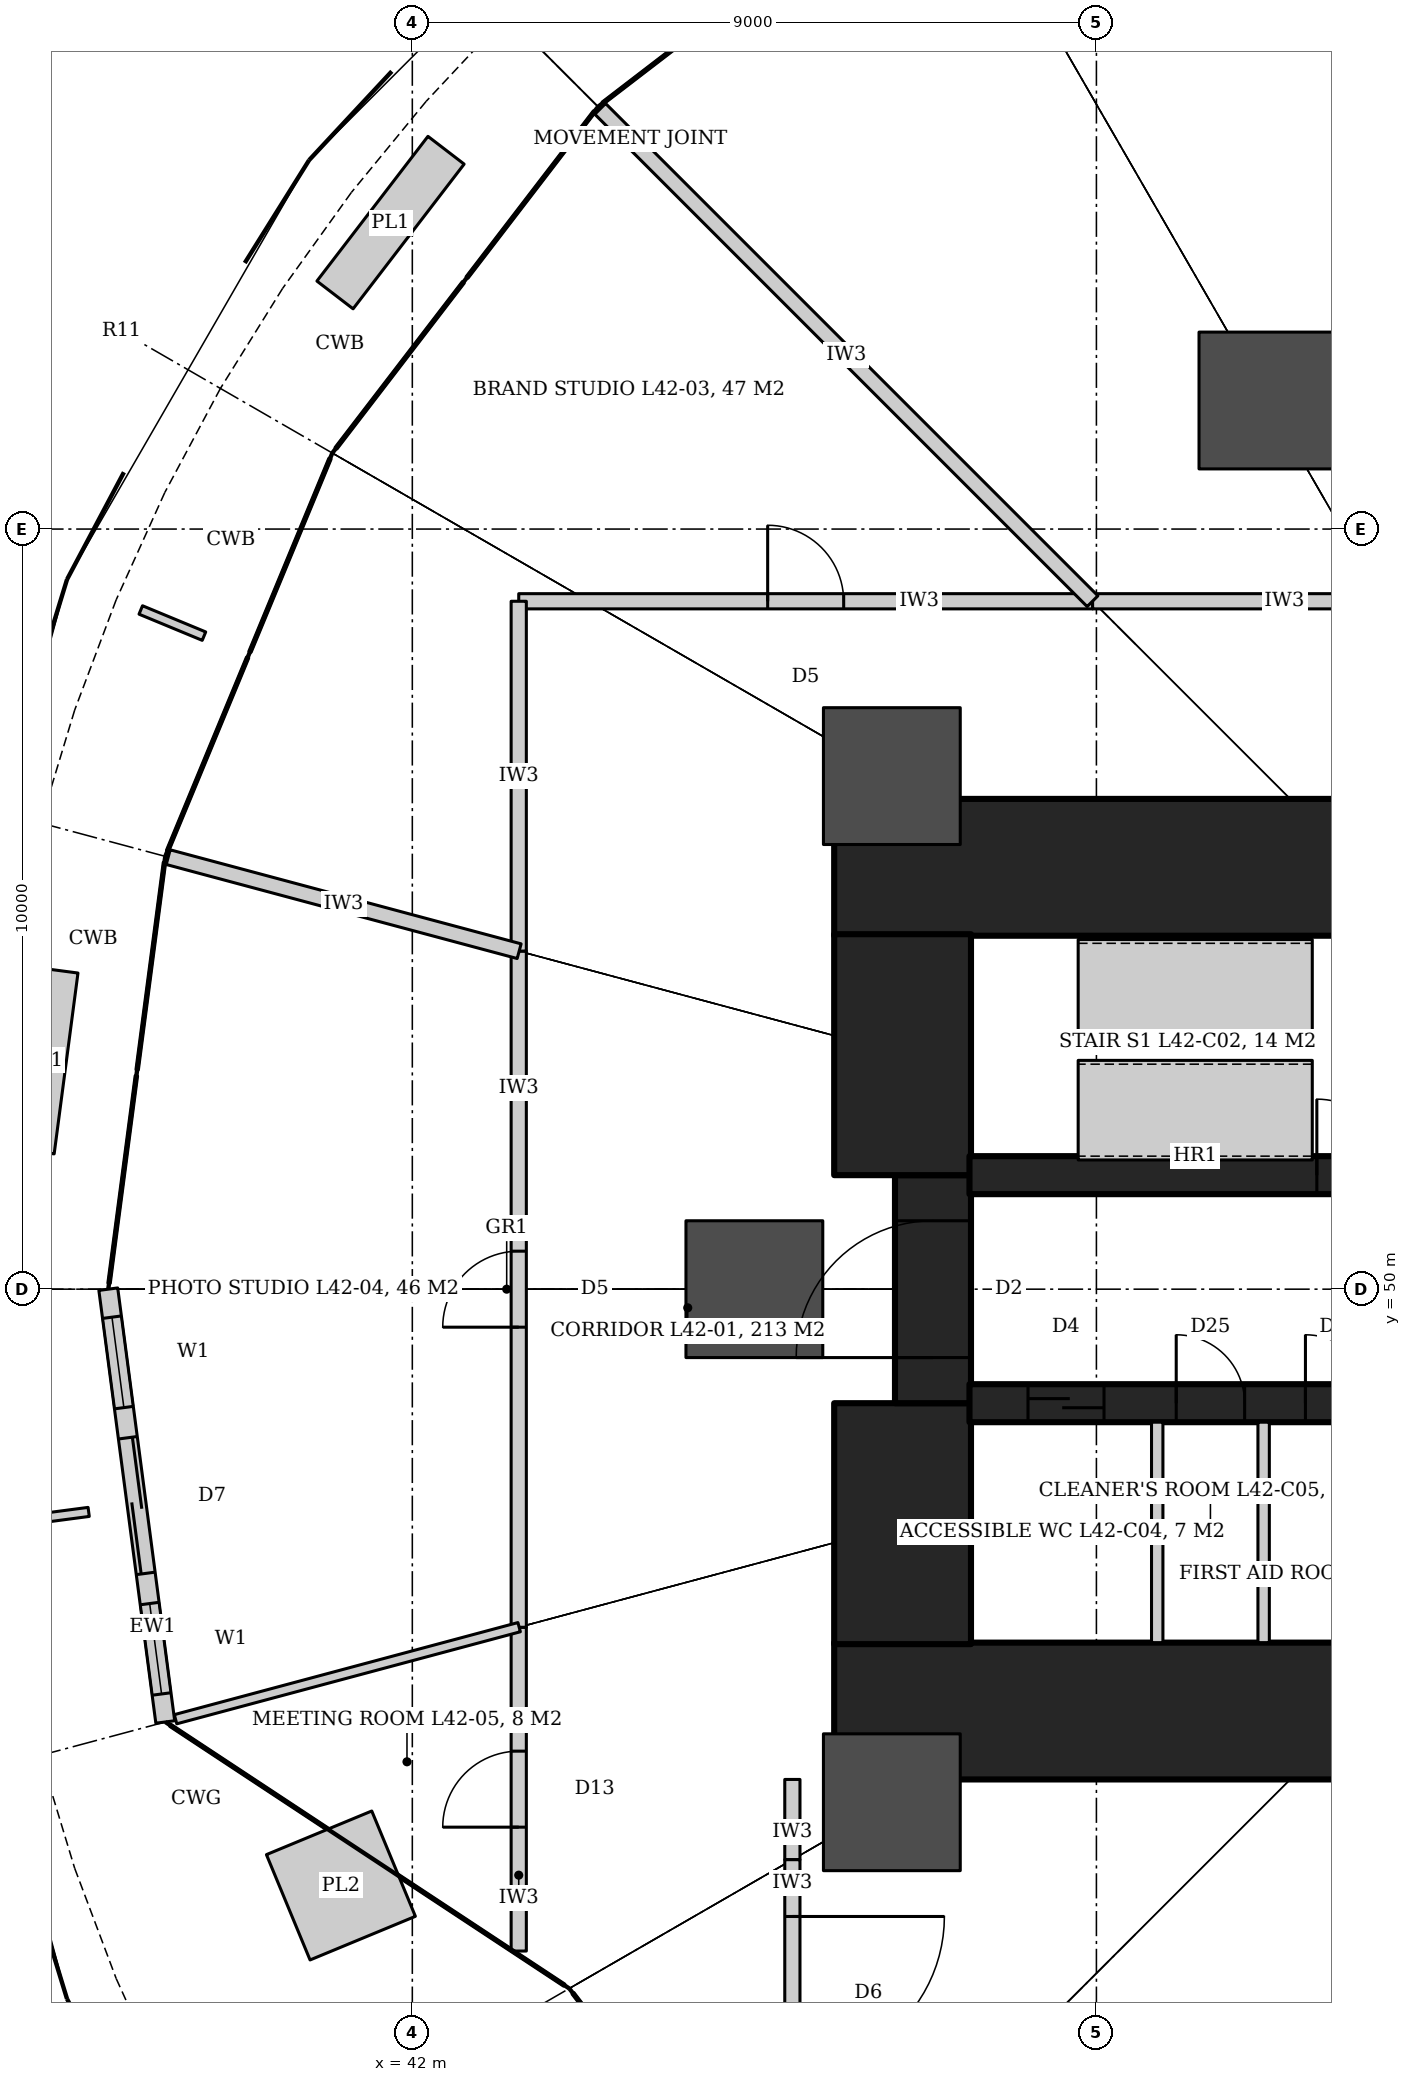
"""IFC4 building model, lengths in metres.
Left out: names, types, materials, properties, quantities, classifications, styles, units other than length and angle.
Written with IfcOpenShell. Run it as: python <this file> out.ifc"""

import sys

from ifc_helpers import new_model, si_unit, direction, frame, frame_2d, origin, origin_2d, place, context, subcontext, project, spatial, rectangle, hollow_circle, extrude, element, fill, save


model = new_model("IFC4")
c1 = context("Model", 3, precision=1e-05, world=origin(), true_north=direction((0.0, 1.0)))
c2 = subcontext(c1, "Body", "Model", "MODEL_VIEW")
j1 = project(units=[si_unit("LENGTHUNIT", "METRE"), si_unit("PLANEANGLEUNIT", "RADIAN")], contexts=[c1])
p1 = place(None, origin())
s1 = spatial("IfcSite", under=j1, at=p1, CompositionType="ELEMENT")
p2 = place(p1, origin())
s2 = spatial("IfcBuilding", under=s1, at=p2, CompositionType="ELEMENT")
p3 = place(p2, frame((0.0, 0.0, 185.6)))
s3 = spatial("IfcBuildingStorey", under=s2, at=p3, CompositionType="ELEMENT", Elevation=185.6)
for number, where, z_axis, x_axis in (
    (1, (47.55, 55.55, 0.0), (0.0, 0.0, 1.0), (1.0, 0.0, 0.0)),
    (2, (47.55, 44.45, 0.0), (0.0, 0.0, 1.0), (1.0, 0.0, 0.0)),
):
    element("IfcWall", number, at=place(p3, frame(where, z_axis=z_axis, x_axis=x_axis)), inside=s3, PredefinedType="SHEAR", context=c2, shape_type="SweptSolid", body=[
        extrude(rectangle(XDim=7.85, YDim=1.8, at=frame_2d((3.925, 0.0))), origin(), (0.0, 0.0, 1.0), 4.2),
    ])
p4 = place(p3, frame((48.45, 45.33, 0.0), z_axis=(0.0, 0.0, 1.0), x_axis=(0.0, 1.0, 0.0)))
e3 = element("IfcWall", 3, at=p4, inside=s3, PredefinedType="SHEAR", context=c2, shape_type="SweptSolid", body=[
    extrude(rectangle(XDim=3.17, YDim=1.8, at=frame_2d((1.585, 0.0))), origin(), (0.0, 0.0, 1.0), 4.2),
])
p5 = place(p3, frame((48.85, 48.5, 0.0), z_axis=(0.0, 0.0, 1.0), x_axis=(0.0, 1.0, 0.0)))
e4 = element("IfcWall", 4, at=p5, inside=s3, PredefinedType="SHEAR", context=c2, shape_type="SweptSolid", body=[
    extrude(rectangle(XDim=3.0, YDim=1.0, at=frame_2d((1.5, 0.0))), origin(), (0.0, 0.0, 1.0), 4.2),
])
p6 = place(p5, frame((0.6, 0.0, 0.0)))
e5 = element("IfcOpeningElement", 5, at=p6, cuts=e4, PredefinedType="OPENING", context=c2, shape_type="SweptSolid", body=[
    extrude(rectangle(XDim=1.8, YDim=2.1, at=frame_2d((0.9, 1.05))), frame((0.0, 0.51, 0.0), z_axis=(0.0, -1.0, 0.0), x_axis=(1.0, 0.0, 0.0)), (0.0, 0.0, 1.0), 1.02),
])
p7 = place(p3, frame((48.45, 51.5, 0.0), z_axis=(0.0, 0.0, 1.0), x_axis=(0.0, 1.0, 0.0)))
e6 = element("IfcWall", 6, at=p7, inside=s3, PredefinedType="SHEAR", context=c2, shape_type="SweptSolid", body=[
    extrude(rectangle(XDim=3.17, YDim=1.8, at=frame_2d((1.585, 0.0))), origin(), (0.0, 0.0, 1.0), 4.2),
])
p8 = place(p3, frame((49.33, 51.5, 0.0), z_axis=(0.0, 0.0, 1.0), x_axis=(1.0, 0.0, 0.0)))
e7 = element("IfcWall", 7, at=p8, inside=s3, PredefinedType="SHEAR", context=c2, shape_type="SweptSolid", body=[
    extrude(rectangle(XDim=6.07, YDim=0.5, at=frame_2d((3.035, 0.0))), origin(), (0.0, 0.0, 1.0), 4.2),
])
p9 = place(p8, frame((4.57, 0.0, 0.0)))
e8 = element("IfcOpeningElement", 8, at=p9, cuts=e7, PredefinedType="OPENING", context=c2, shape_type="SweptSolid", body=[
    extrude(rectangle(XDim=1.0, YDim=2.1, at=frame_2d((0.5, 1.05))), frame((0.0, 0.26, 0.0), z_axis=(0.0, -1.0, 0.0), x_axis=(1.0, 0.0, 0.0)), (0.0, 0.0, 1.0), 0.52),
])
p10 = place(p3, frame((49.33, 48.5, 0.0), z_axis=(0.0, 0.0, 1.0), x_axis=(1.0, 0.0, 0.0)))
e9 = element("IfcWall", 9, at=p10, inside=s3, PredefinedType="SHEAR", context=c2, shape_type="SweptSolid", body=[
    extrude(rectangle(XDim=6.07, YDim=0.5, at=frame_2d((3.035, 0.0))), origin(), (0.0, 0.0, 1.0), 4.2),
])
p11 = place(p10, frame((0.77, 0.0, 0.0)))
e10 = element("IfcOpeningElement", 10, at=p11, cuts=e9, PredefinedType="OPENING", context=c2, shape_type="SweptSolid", body=[
    extrude(rectangle(XDim=1.0, YDim=2.1, at=frame_2d((0.5, 1.05))), frame((0.0, 0.26, 0.0), z_axis=(0.0, -1.0, 0.0), x_axis=(1.0, 0.0, 0.0)), (0.0, 0.0, 1.0), 0.52),
])
p12 = place(p10, frame((2.72, 0.0, 0.0)))
e11 = element("IfcOpeningElement", 11, at=p12, cuts=e9, PredefinedType="OPENING", context=c2, shape_type="SweptSolid", body=[
    extrude(rectangle(XDim=0.9, YDim=2.1, at=frame_2d((0.45, 1.05))), frame((0.0, 0.26, 0.0), z_axis=(0.0, -1.0, 0.0), x_axis=(1.0, 0.0, 0.0)), (0.0, 0.0, 1.0), 0.52),
])
p13 = place(p10, frame((4.42, 0.0, 0.0)))
e12 = element("IfcOpeningElement", 12, at=p13, cuts=e9, PredefinedType="OPENING", context=c2, shape_type="SweptSolid", body=[
    extrude(rectangle(XDim=0.9, YDim=2.1, at=frame_2d((0.45, 1.05))), frame((0.0, 0.26, 0.0), z_axis=(0.0, -1.0, 0.0), x_axis=(1.0, 0.0, 0.0)), (0.0, 0.0, 1.0), 0.52),
])
for number, where, z_axis, x_axis in (
    (13, (53.25, 61.691, 0.0), (0.0, 0.0, 1.0), (1.0, 0.0, 0.0)),
    (14, (48.309, 56.75, 0.0), (0.0, 0.0, 1.0), (1.0, 0.0, 0.0)),
    (15, (46.5, 50.0, 0.0), (0.0, 0.0, 1.0), (1.0, 0.0, 0.0)),
    (16, (48.309, 43.25, 0.0), (0.0, 0.0, 1.0), (1.0, 0.0, 0.0)),
):
    element("IfcColumn", number, at=place(p3, frame(where, z_axis=z_axis, x_axis=x_axis)), inside=s3, PredefinedType="COLUMN", context=c2, shape_type="SweptSolid", body=[
        extrude(hollow_circle(Radius=0.9, WallThickness=0.09, at=origin_2d()), origin(), (0.0, 0.0, 1.0), 4.2),
    ])
p14 = place(p3, frame((43.4, 59.05, 0.0), z_axis=(0.0, 0.0, 1.0), x_axis=(1.0, 0.0, 0.0)))
e17 = element("IfcWall", 17, at=p14, inside=s3, PredefinedType="PARTITIONING", context=c2, shape_type="SweptSolid", body=[
    extrude(rectangle(XDim=7.55, YDim=0.2, at=frame_2d((3.775, 0.0))), origin(), (0.0, 0.0, 1.0), 3.012),
])
p15 = place(p14, frame((3.275, 0.0, 0.0)))
e18 = element("IfcOpeningElement", 18, at=p15, cuts=e17, PredefinedType="OPENING", context=c2, shape_type="SweptSolid", body=[
    extrude(rectangle(XDim=1.0, YDim=2.1, at=frame_2d((0.5, 1.05))), frame((0.0, 0.11, 0.0), z_axis=(0.0, -1.0, 0.0), x_axis=(1.0, 0.0, 0.0)), (0.0, 0.0, 1.0), 0.22),
])
p16 = place(p3, frame((50.95, 59.05, 0.0), z_axis=(0.0, 0.0, 1.0), x_axis=(1.0, 0.0, 0.0)))
e19 = element("IfcWall", 19, at=p16, inside=s3, PredefinedType="PARTITIONING", context=c2, shape_type="SweptSolid", body=[
    extrude(rectangle(XDim=25.65, YDim=0.2, at=frame_2d((12.825, 0.0))), origin(), (0.0, 0.0, 1.0), 3.012),
])
p17 = place(p16, frame((11.825, 0.0, 0.0)))
e20 = element("IfcOpeningElement", 20, at=p17, cuts=e19, PredefinedType="OPENING", context=c2, shape_type="SweptSolid", body=[
    extrude(rectangle(XDim=2.0, YDim=2.1, at=frame_2d((1.0, 1.05))), frame((0.0, 0.11, 0.0), z_axis=(0.0, -1.0, 0.0), x_axis=(1.0, 0.0, 0.0)), (0.0, 0.0, 1.0), 0.22),
])
p18 = place(p3, frame((47.0, 43.55, 0.0), z_axis=(0.0, 0.0, 1.0), x_axis=(0.0, -1.0, 0.0)))
e21 = element("IfcWall", 21, at=p18, inside=s3, PredefinedType="PARTITIONING", context=c2, shape_type="SweptSolid", body=[
    extrude(rectangle(XDim=1.056, YDim=0.2, at=frame_2d((0.528, 0.0))), origin(), (0.0, 0.0, 1.0), 3.012),
])
p19 = place(p3, frame((47.0, 42.494, 0.0), z_axis=(0.0, 0.0, 1.0), x_axis=(0.0, -1.0, 0.0)))
e22 = element("IfcWall", 22, at=p19, inside=s3, PredefinedType="PARTITIONING", context=c2, shape_type="SweptSolid", body=[
    extrude(rectangle(XDim=3.494, YDim=0.2, at=frame_2d((1.747, 0.0))), origin(), (0.0, 0.0, 1.0), 3.012),
])
p20 = place(p19, frame((0.747, 0.0, 0.0)))
e23 = element("IfcOpeningElement", 23, at=p20, cuts=e22, PredefinedType="OPENING", context=c2, shape_type="SweptSolid", body=[
    extrude(rectangle(XDim=2.0, YDim=2.1, at=frame_2d((1.0, 1.05))), frame((0.0, 0.11, 0.0), z_axis=(0.0, -1.0, 0.0), x_axis=(1.0, 0.0, 0.0)), (0.0, 0.0, 1.0), 0.22),
])
p21 = place(p3, frame((43.4, 41.292, 0.0), z_axis=(0.0, 0.0, 1.0), x_axis=(0.0, 1.0, 0.0)))
e24 = element("IfcWall", 24, at=p21, inside=s3, PredefinedType="PARTITIONING", context=c2, shape_type="SweptSolid", body=[
    extrude(rectangle(XDim=4.26, YDim=0.2, at=frame_2d((2.13, 0.0))), origin(), (0.0, 0.0, 1.0), 3.012),
])
p22 = place(p21, frame((1.63, 0.0, 0.0)))
e25 = element("IfcOpeningElement", 25, at=p22, cuts=e24, PredefinedType="OPENING", context=c2, shape_type="SweptSolid", body=[
    extrude(rectangle(XDim=1.0, YDim=2.4, at=frame_2d((0.5, 1.2))), frame((0.0, 0.11, 0.0), z_axis=(0.0, -1.0, 0.0), x_axis=(1.0, 0.0, 0.0)), (0.0, 0.0, 1.0), 0.22),
])
p23 = place(p3, frame((43.4, 45.552, 0.0), z_axis=(0.0, 0.0, 1.0), x_axis=(0.0, 1.0, 0.0)))
e26 = element("IfcWall", 26, at=p23, inside=s3, PredefinedType="PARTITIONING", context=c2, shape_type="SweptSolid", body=[
    extrude(rectangle(XDim=8.896, YDim=0.2, at=frame_2d((4.448, 0.0))), origin(), (0.0, 0.0, 1.0), 3.012),
])
p24 = place(p23, frame((3.948, 0.0, 0.0)))
e27 = element("IfcOpeningElement", 27, at=p24, cuts=e26, PredefinedType="OPENING", context=c2, shape_type="SweptSolid", body=[
    extrude(rectangle(XDim=1.0, YDim=2.1, at=frame_2d((0.5, 1.05))), frame((0.0, 0.11, 0.0), z_axis=(0.0, -1.0, 0.0), x_axis=(1.0, 0.0, 0.0)), (0.0, 0.0, 1.0), 0.22),
])
p25 = place(p3, frame((43.4, 54.448, 0.0), z_axis=(0.0, 0.0, 1.0), x_axis=(0.0, 1.0, 0.0)))
e28 = element("IfcWall", 28, at=p25, inside=s3, PredefinedType="PARTITIONING", context=c2, shape_type="SweptSolid", body=[
    extrude(rectangle(XDim=4.602, YDim=0.2, at=frame_2d((2.301, 0.0))), origin(), (0.0, 0.0, 1.0), 3.012),
])
p26 = place(p3, frame((50.949, 59.051, 0.0), z_axis=(0.0, 0.0, 1.0), x_axis=(-0.707106781187, 0.707106781187, 0.0)))
e29 = element("IfcWall", 29, at=p26, inside=s3, PredefinedType="PARTITIONING", context=c2, shape_type="SweptSolid", body=[
    extrude(rectangle(XDim=9.16, YDim=0.2, at=frame_2d((4.58, 0.0))), origin(), (0.0, 0.0, 1.0), 3.012),
])
p27 = place(p3, frame((43.406, 54.447, 0.0), z_axis=(0.0, 0.0, 1.0), x_axis=(-0.965931637459, 0.258797356546, 0.0)))
e30 = element("IfcWall", 30, at=p27, inside=s3, PredefinedType="PARTITIONING", context=c2, shape_type="SweptSolid", body=[
    extrude(rectangle(XDim=4.78, YDim=0.2, at=frame_2d((2.39, 0.0))), origin(), (0.0, 0.0, 1.0), 3.012),
])
p28 = place(p3, frame((43.406, 45.553, 0.0), z_axis=(0.0, 0.0, 1.0), x_axis=(-0.965930354879, -0.258802143582, 0.0)))
e31 = element("IfcWall", 31, at=p28, inside=s3, PredefinedType="PARTITIONING", context=c2, shape_type="SweptSolid", body=[
    extrude(rectangle(XDim=4.68, YDim=0.125, at=frame_2d((2.34, 0.0))), origin(), (0.0, 0.0, 1.0), 3.012),
])
p29 = place(p3, frame((38.0, 50.0, 0.0), z_axis=(0.0, 0.0, 1.0), x_axis=(0.130503995834, -0.991447783331, 0.0)))
e32 = element("IfcWall", 32, at=p29, inside=s3, PredefinedType="SOLIDWALL", context=c2, shape_type="SweptSolid", body=[
    extrude(rectangle(XDim=5.743, YDim=0.25, at=frame_2d((2.872, 0.0))), origin(), (0.0, 0.0, 1.0), 4.04),
])
p30 = place(p29, frame((1.972, 0.0, 0.0)))
e33 = element("IfcOpeningElement", 33, at=p30, cuts=e32, PredefinedType="OPENING", context=c2, shape_type="SweptSolid", body=[
    extrude(rectangle(XDim=1.8, YDim=2.4, at=frame_2d((0.9, 1.2))), frame((0.0, 0.135, 0.0), z_axis=(0.0, -1.0, 0.0), x_axis=(1.0, 0.0, 0.0)), (0.0, 0.0, 1.0), 0.27),
])
p31 = place(p29, frame((0.372, 0.0, 0.0)))
e34 = element("IfcOpeningElement", 34, at=p31, cuts=e32, PredefinedType="OPENING", context=c2, shape_type="SweptSolid", body=[
    extrude(rectangle(XDim=1.2, YDim=2.4, at=frame_2d((0.6, 1.2))), frame((0.0, 0.135, 0.0), z_axis=(0.0, -1.0, 0.0), x_axis=(1.0, 0.0, 0.0)), (0.0, 0.0, 1.0), 0.27),
])
p32 = place(p29, frame((4.172, 0.0, 0.0)))
e35 = element("IfcOpeningElement", 35, at=p32, cuts=e32, PredefinedType="OPENING", context=c2, shape_type="SweptSolid", body=[
    extrude(rectangle(XDim=1.2, YDim=2.4, at=frame_2d((0.6, 1.2))), frame((0.0, 0.135, 0.0), z_axis=(0.0, -1.0, 0.0), x_axis=(1.0, 0.0, 0.0)), (0.0, 0.0, 1.0), 0.27),
])
for number, where, z_axis, x_axis in (
    (36, (51.8, 45.35, 0.0), (0.0, 0.0, 1.0), (0.0, 1.0, 0.0)),
    (37, (53.2, 45.35, 0.0), (0.0, 0.0, 1.0), (0.0, 1.0, 0.0)),
):
    element("IfcWall", number, at=place(p3, frame(where, z_axis=z_axis, x_axis=x_axis)), inside=s3, PredefinedType="PARTITIONING", context=c2, shape_type="SweptSolid", body=[
        extrude(rectangle(XDim=2.9, YDim=0.15, at=frame_2d((1.45, 0.0))), origin(), (0.0, 0.0, 1.0), 4.04),
    ])
p33 = place(p15, origin())
e38 = element("IfcDoor", 38, at=p33, inside=s3, OperationType="SINGLE_SWING_LEFT", PredefinedType="DOOR", context=c2, shape_type="SweptSolid", body=[
    extrude(rectangle(XDim=1.0, YDim=2.1, at=frame_2d((0.5, 1.05))), frame((0.0, 0.025, 0.0), z_axis=(0.0, -1.0, 0.0), x_axis=(1.0, 0.0, 0.0)), (0.0, 0.0, 1.0), 0.05),
])
fill(e18, e38)
p34 = place(p24, origin())
e39 = element("IfcDoor", 39, at=p34, inside=s3, OperationType="SINGLE_SWING_LEFT", PredefinedType="DOOR", context=c2, shape_type="SweptSolid", body=[
    extrude(rectangle(XDim=1.0, YDim=2.1, at=frame_2d((0.5, 1.05))), frame((0.0, 0.025, 0.0), z_axis=(0.0, -1.0, 0.0), x_axis=(1.0, 0.0, 0.0)), (0.0, 0.0, 1.0), 0.05),
])
fill(e27, e39)
p35 = place(p22, origin())
e40 = element("IfcDoor", 40, at=p35, inside=s3, OperationType="SINGLE_SWING_LEFT", PredefinedType="DOOR", context=c2, shape_type="SweptSolid", body=[
    extrude(rectangle(XDim=1.0, YDim=2.4, at=frame_2d((0.5, 1.2))), frame((0.0, 0.025, 0.0), z_axis=(0.0, -1.0, 0.0), x_axis=(1.0, 0.0, 0.0)), (0.0, 0.0, 1.0), 0.05),
])
fill(e25, e40)
p36 = place(p20, origin())
e41 = element("IfcDoor", 41, at=p36, inside=s3, OperationType="DOUBLE_DOOR_DOUBLE_SWING", PredefinedType="DOOR", context=c2, shape_type="SweptSolid", body=[
    extrude(rectangle(XDim=2.0, YDim=2.1, at=frame_2d((1.0, 1.05))), frame((0.0, 0.025, 0.0), z_axis=(0.0, -1.0, 0.0), x_axis=(1.0, 0.0, 0.0)), (0.0, 0.0, 1.0), 0.05),
])
fill(e23, e41)
p37 = place(p30, origin())
e42 = element("IfcDoor", 42, at=p37, inside=s3, OperationType="DOUBLE_DOOR_SLIDING", PredefinedType="DOOR", context=c2, shape_type="SweptSolid", body=[
    extrude(rectangle(XDim=1.8, YDim=2.4, at=frame_2d((0.9, 1.2))), frame((0.0, 0.025, 0.0), z_axis=(0.0, -1.0, 0.0), x_axis=(1.0, 0.0, 0.0)), (0.0, 0.0, 1.0), 0.05),
])
fill(e33, e42)
p38 = place(p31, origin())
e43 = element("IfcWindow", 43, at=p38, inside=s3, PartitioningType="SINGLE_PANEL", PredefinedType="WINDOW", context=c2, shape_type="SweptSolid", body=[
    extrude(rectangle(XDim=1.2, YDim=2.4, at=frame_2d((0.6, 1.2))), frame((0.0, 0.03, 0.0), z_axis=(0.0, -1.0, 0.0), x_axis=(1.0, 0.0, 0.0)), (0.0, 0.0, 1.0), 0.06),
])
fill(e34, e43)
p39 = place(p32, origin())
e44 = element("IfcWindow", 44, at=p39, inside=s3, PartitioningType="SINGLE_PANEL", PredefinedType="WINDOW", context=c2, shape_type="SweptSolid", body=[
    extrude(rectangle(XDim=1.2, YDim=2.4, at=frame_2d((0.6, 1.2))), frame((0.0, 0.03, 0.0), z_axis=(0.0, -1.0, 0.0), x_axis=(1.0, 0.0, 0.0)), (0.0, 0.0, 1.0), 0.06),
])
fill(e35, e44)
p40 = place(p9, origin())
e45 = element("IfcDoor", 45, at=p40, inside=s3, OperationType="SINGLE_SWING_LEFT", PredefinedType="DOOR", context=c2, shape_type="SweptSolid", body=[
    extrude(rectangle(XDim=1.0, YDim=2.1, at=frame_2d((0.5, 1.05))), frame((0.0, 0.025, 0.0), z_axis=(0.0, -1.0, 0.0), x_axis=(1.0, 0.0, 0.0)), (0.0, 0.0, 1.0), 0.05),
])
fill(e8, e45)
p41 = place(p11, origin())
e46 = element("IfcDoor", 46, at=p41, inside=s3, OperationType="SLIDING_TO_LEFT", PredefinedType="DOOR", context=c2, shape_type="SweptSolid", body=[
    extrude(rectangle(XDim=1.0, YDim=2.1, at=frame_2d((0.5, 1.05))), frame((0.0, 0.025, 0.0), z_axis=(0.0, -1.0, 0.0), x_axis=(1.0, 0.0, 0.0)), (0.0, 0.0, 1.0), 0.05),
])
fill(e10, e46)
p42 = place(p12, origin())
e47 = element("IfcDoor", 47, at=p42, inside=s3, OperationType="SINGLE_SWING_RIGHT", PredefinedType="DOOR", context=c2, shape_type="SweptSolid", body=[
    extrude(rectangle(XDim=0.9, YDim=2.1, at=frame_2d((0.45, 1.05))), frame((0.0, 0.025, 0.0), z_axis=(0.0, -1.0, 0.0), x_axis=(1.0, 0.0, 0.0)), (0.0, 0.0, 1.0), 0.05),
])
fill(e11, e47)
p43 = place(p13, origin())
e48 = element("IfcDoor", 48, at=p43, inside=s3, OperationType="SINGLE_SWING_RIGHT", PredefinedType="DOOR", context=c2, shape_type="SweptSolid", body=[
    extrude(rectangle(XDim=0.9, YDim=2.1, at=frame_2d((0.45, 1.05))), frame((0.0, 0.025, 0.0), z_axis=(0.0, -1.0, 0.0), x_axis=(1.0, 0.0, 0.0)), (0.0, 0.0, 1.0), 0.05),
])
fill(e12, e48)
p44 = place(p6, origin())
e49 = element("IfcDoor", 49, at=p44, inside=s3, OperationType="DOUBLE_DOOR_DOUBLE_SWING", PredefinedType="DOOR", context=c2, shape_type="SweptSolid", body=[
    extrude(rectangle(XDim=1.8, YDim=2.1, at=frame_2d((0.9, 1.05))), frame((0.0, 0.025, 0.0), z_axis=(0.0, -1.0, 0.0), x_axis=(1.0, 0.0, 0.0)), (0.0, 0.0, 1.0), 0.05),
])
fill(e5, e49)
save(model, sys.argv[1])
